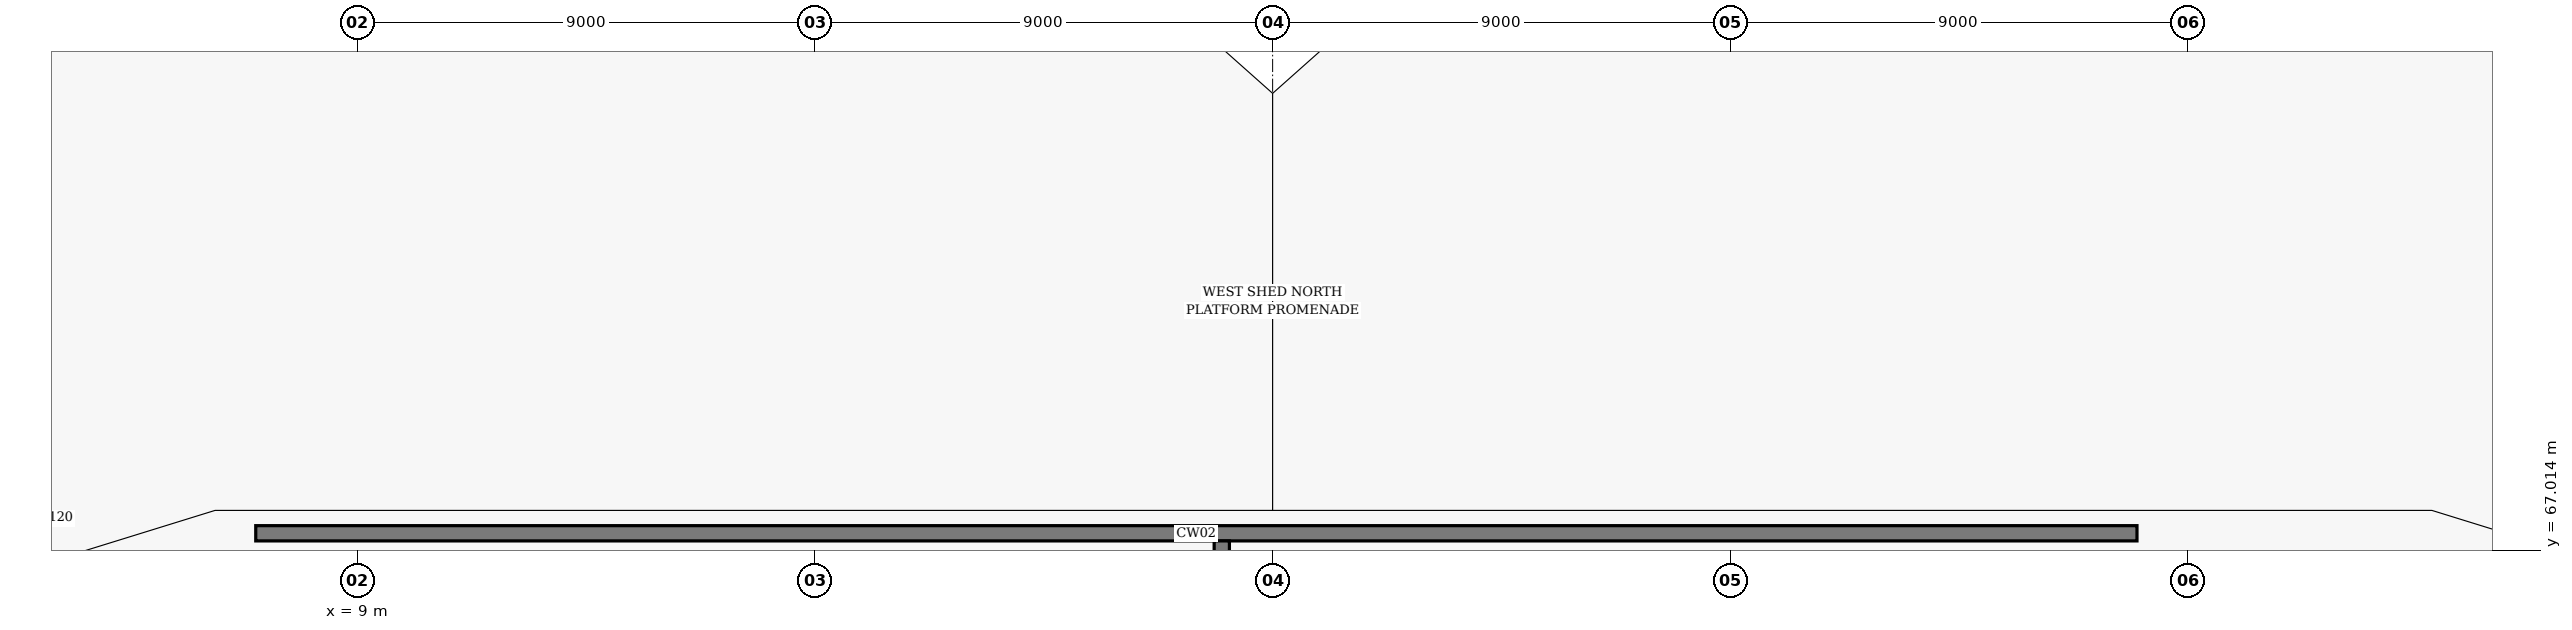
"""IFC4 building model, lengths in metres.
Left out: names, types, materials, properties, quantities, classifications, styles, units other than length and angle.
Written with IfcOpenShell. Run it as: python <this file> out.ifc"""

import sys

from ifc_helpers import new_model, si_unit, direction, frame, frame_2d, origin, place, context, subcontext, project, spatial, rectangle, extrude, element, save


model = new_model("IFC4")
c1 = context("Model", 3, precision=1e-05, world=origin(), true_north=direction((0.0, 1.0)))
c2 = subcontext(c1, "Body", "Model", "MODEL_VIEW")
j1 = project(units=[si_unit("LENGTHUNIT", "METRE"), si_unit("PLANEANGLEUNIT", "RADIAN")], contexts=[c1])
p1 = place(None, origin())
s1 = spatial("IfcSite", under=j1, at=p1, CompositionType="ELEMENT")
p2 = place(p1, origin())
s2 = spatial("IfcBuilding", under=s1, at=p2, CompositionType="ELEMENT")
p3 = place(p2, origin())
s3 = spatial("IfcBuildingStorey", under=s2, at=p3, CompositionType="ELEMENT", Elevation=0.0)
p4 = place(p3, frame((7.0, 67.35, 0.0), z_axis=(0.0, 0.0, 1.0), x_axis=(1.0, 0.0, 0.0)))
e1 = element("IfcWall", 1, at=p4, inside=s3, PredefinedType="SOLIDWALL", context=c2, shape_type="SweptSolid", body=[
    extrude(rectangle(XDim=37.0, YDim=0.3, at=frame_2d((18.5, 0.0))), origin(), (0.0, 0.0, 1.0), 0.375),
])
p5 = place(p3, frame((26.0, 62.4, 0.0), z_axis=(0.0, 0.0, 1.0), x_axis=(0.0, 1.0, 0.0)))
e2 = element("IfcWall", 2, at=p5, inside=s3, PredefinedType="SOLIDWALL", context=c2, shape_type="SweptSolid", body=[
    extrude(rectangle(XDim=4.8, YDim=0.3, at=frame_2d((2.4, 0.0))), origin(), (0.0, 0.0, 1.0), 0.375),
])
save(model, sys.argv[1])
